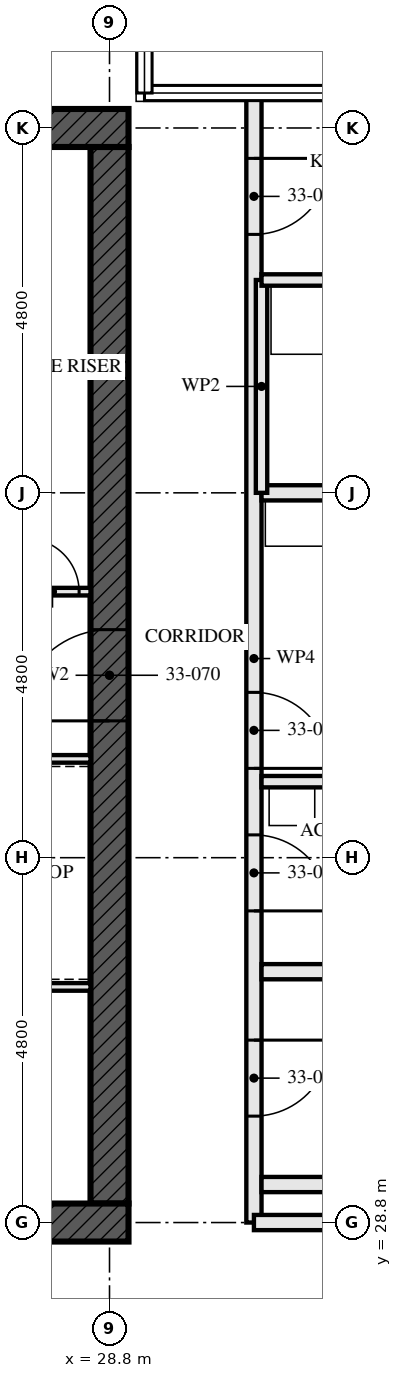
"""IFC4 building model, lengths in metres.
Left out: names, types, materials, properties, quantities, classifications, styles, units other than length and angle.
Written with IfcOpenShell. Run it as: python <this file> out.ifc"""

import sys

from ifc_helpers import new_model, si_unit, direction, frame, frame_2d, origin, place, context, subcontext, project, spatial, rectangle, extrude, element, fill, save


model = new_model("IFC4")
c1 = context("Model", 3, precision=1e-05, world=origin(), true_north=direction((0.0, 1.0)))
c2 = subcontext(c1, "Body", "Model", "MODEL_VIEW")
j1 = project(units=[si_unit("LENGTHUNIT", "METRE"), si_unit("PLANEANGLEUNIT", "RADIAN")], contexts=[c1])
p1 = place(None, origin())
s1 = spatial("IfcSite", under=j1, at=p1, CompositionType="ELEMENT")
p2 = place(p1, origin())
s2 = spatial("IfcBuilding", under=s1, at=p2, CompositionType="ELEMENT")
p3 = place(p2, frame((0.0, 0.0, 122.5)))
s3 = spatial("IfcBuildingStorey", under=s2, at=p3, CompositionType="ELEMENT", Elevation=122.5)
p4 = place(p3, frame((14.15, 28.8, -0.17), z_axis=(0.0, 0.0, 1.0), x_axis=(1.0, 0.0, 0.0)))
e1 = element("IfcWall", 1, at=p4, inside=s3, PredefinedType="SHEAR", context=c2, shape_type="SweptSolid", body=[
    extrude(rectangle(XDim=14.9, YDim=0.5, at=frame_2d((7.45, 0.0))), origin(), (0.0, 0.0, 1.0), 3.5),
])
p5 = place(p4, frame((6.85, 0.0, 0.17)))
e2 = element("IfcOpeningElement", 2, at=p5, cuts=e1, PredefinedType="OPENING", context=c2, shape_type="SweptSolid", body=[
    extrude(rectangle(XDim=1.2, YDim=2.1, at=frame_2d((0.6, 1.05))), frame((0.0, 0.26, 0.0), z_axis=(0.0, -1.0, 0.0), x_axis=(1.0, 0.0, 0.0)), (0.0, 0.0, 1.0), 0.521),
])
p6 = place(p3, frame((29.05, 43.2, -0.17), z_axis=(0.0, 0.0, 1.0), x_axis=(-1.0, 0.0, 0.0)))
e3 = element("IfcWall", 3, at=p6, inside=s3, PredefinedType="SHEAR", context=c2, shape_type="SweptSolid", body=[
    extrude(rectangle(XDim=14.9, YDim=0.5, at=frame_2d((7.45, 0.0))), origin(), (0.0, 0.0, 1.0), 3.5),
])
p7 = place(p6, frame((6.85, 0.0, 0.17)))
e4 = element("IfcOpeningElement", 4, at=p7, cuts=e3, PredefinedType="OPENING", context=c2, shape_type="SweptSolid", body=[
    extrude(rectangle(XDim=1.2, YDim=2.1, at=frame_2d((0.6, 1.05))), frame((0.0, 0.26, 0.0), z_axis=(0.0, -1.0, 0.0), x_axis=(1.0, 0.0, 0.0)), (0.0, 0.0, 1.0), 0.521),
])
p8 = place(p3, frame((28.8, 29.05, -0.17), z_axis=(0.0, 0.0, 1.0), x_axis=(0.0, 1.0, 0.0)))
e5 = element("IfcWall", 5, at=p8, inside=s3, PredefinedType="SHEAR", context=c2, shape_type="SweptSolid", body=[
    extrude(rectangle(XDim=13.9, YDim=0.5, at=frame_2d((6.95, 0.0))), origin(), (0.0, 0.0, 1.0), 3.5),
])
p9 = place(p8, frame((6.35, 0.0, 0.17)))
e6 = element("IfcOpeningElement", 6, at=p9, cuts=e5, PredefinedType="OPENING", context=c2, shape_type="SweptSolid", body=[
    extrude(rectangle(XDim=1.2, YDim=2.1, at=frame_2d((0.6, 1.05))), frame((0.0, 0.26, 0.0), z_axis=(0.0, -1.0, 0.0), x_axis=(1.0, 0.0, 0.0)), (0.0, 0.0, 1.0), 0.521),
])
for number, where, z_axis, x_axis in (
    (7, (35.5, 29.3, 0.0), (0.0, 0.0, 1.0), (-1.0, 0.0, 0.0)),
    (8, (35.5, 32.1, 0.0), (0.0, 0.0, 1.0), (-1.0, 0.0, 0.0)),
):
    element("IfcWall", number, at=place(p3, frame(where, z_axis=z_axis, x_axis=x_axis)), inside=s3, PredefinedType="SOLIDWALL", context=c2, shape_type="SweptSolid", body=[
        extrude(rectangle(XDim=4.7, YDim=0.2, at=frame_2d((2.35, 0.0))), origin(), (0.0, 0.0, 1.0), 2.99),
    ])
p10 = place(p3, frame((33.8, 34.6, 0.0), z_axis=(0.0, 0.0, 1.0), x_axis=(-1.0, 0.0, 0.0)))
e9 = element("IfcWall", 9, at=p10, inside=s3, PredefinedType="PARTITIONING", context=c2, shape_type="SweptSolid", body=[
    extrude(rectangle(XDim=3.0, YDim=0.15, at=frame_2d((1.5, 0.0))), origin(), (0.0, 0.0, 1.0), 3.33),
])
p11 = place(p3, frame((38.08, 38.4, 0.0), z_axis=(0.0, 0.0, 1.0), x_axis=(-1.0, 0.0, 0.0)))
e10 = element("IfcWall", 10, at=p11, inside=s3, PredefinedType="PARTITIONING", context=c2, shape_type="SweptSolid", body=[
    extrude(rectangle(XDim=7.28, YDim=0.2, at=frame_2d((3.64, 0.0))), origin(), (0.0, 0.0, 1.0), 2.55),
])
p12 = place(p3, frame((33.8, 41.2, 0.0), z_axis=(0.0, 0.0, 1.0), x_axis=(-1.0, 0.0, 0.0)))
e11 = element("IfcWall", 11, at=p12, inside=s3, PredefinedType="PARTITIONING", context=c2, shape_type="SweptSolid", body=[
    extrude(rectangle(XDim=3.0, YDim=0.15, at=frame_2d((1.5, 0.0))), origin(), (0.0, 0.0, 1.0), 3.33),
])
p13 = place(p3, frame((30.8, 38.4, 0.0), z_axis=(0.0, 0.0, 1.0), x_axis=(0.0, 1.0, 0.0)))
e12 = element("IfcWall", 12, at=p13, inside=s3, PredefinedType="PARTITIONING", context=c2, shape_type="SweptSolid", body=[
    extrude(rectangle(XDim=2.8, YDim=0.15, at=frame_2d((1.4, 0.0))), origin(), (0.0, 0.0, 1.0), 3.33),
])
p14 = place(p3, frame((30.7, 28.8, 0.0), z_axis=(0.0, 0.0, 1.0), x_axis=(0.0, 1.0, 0.0)))
e13 = element("IfcWall", 13, at=p14, inside=s3, PredefinedType="PARTITIONING", context=c2, shape_type="SweptSolid", body=[
    extrude(rectangle(XDim=14.84, YDim=0.2, at=frame_2d((7.42, 0.0))), origin(), (0.0, 0.0, 1.0), 2.32),
])
p15 = place(p14, frame((1.4, 0.0, 0.0)))
e14 = element("IfcOpeningElement", 14, at=p15, cuts=e13, PredefinedType="OPENING", context=c2, shape_type="SweptSolid", body=[
    extrude(rectangle(XDim=1.0, YDim=2.1, at=frame_2d((0.5, 1.05))), frame((0.0, 0.111, 0.0), z_axis=(0.0, -1.0, 0.0), x_axis=(1.0, 0.0, 0.0)), (0.0, 0.0, 1.0), 0.221),
])
p16 = place(p14, frame((4.1, 0.0, 0.0)))
e15 = element("IfcOpeningElement", 15, at=p16, cuts=e13, PredefinedType="OPENING", context=c2, shape_type="SweptSolid", body=[
    extrude(rectangle(XDim=1.0, YDim=2.1, at=frame_2d((0.5, 1.05))), frame((0.0, 0.111, 0.0), z_axis=(0.0, -1.0, 0.0), x_axis=(1.0, 0.0, 0.0)), (0.0, 0.0, 1.0), 0.221),
])
p17 = place(p14, frame((5.975, 0.0, 0.0)))
e16 = element("IfcOpeningElement", 16, at=p17, cuts=e13, PredefinedType="OPENING", context=c2, shape_type="SweptSolid", body=[
    extrude(rectangle(XDim=1.0, YDim=2.1, at=frame_2d((0.5, 1.05))), frame((0.0, 0.111, 0.0), z_axis=(0.0, -1.0, 0.0), x_axis=(1.0, 0.0, 0.0)), (0.0, 0.0, 1.0), 0.221),
])
p18 = place(p14, frame((13.0, 0.0, 0.0)))
e17 = element("IfcOpeningElement", 17, at=p18, cuts=e13, PredefinedType="OPENING", context=c2, shape_type="SweptSolid", body=[
    extrude(rectangle(XDim=1.0, YDim=2.1, at=frame_2d((0.5, 1.05))), frame((0.0, 0.111, 0.0), z_axis=(0.0, -1.0, 0.0), x_axis=(1.0, 0.0, 0.0)), (0.0, 0.0, 1.0), 0.221),
])
p19 = place(p3, frame((23.05, 34.9, 0.0), z_axis=(0.0, 0.0, 1.0), x_axis=(1.0, 0.0, 0.0)))
e18 = element("IfcWall", 18, at=p19, inside=s3, PredefinedType="SOLIDWALL", context=c2, shape_type="SweptSolid", body=[
    extrude(rectangle(XDim=5.5, YDim=0.1, at=frame_2d((2.75, 0.0))), origin(), (0.0, 0.0, 1.0), 3.33),
])
p20 = place(p3, frame((22.65, 37.1, 0.0), z_axis=(0.0, 0.0, 1.0), x_axis=(1.0, 0.0, 0.0)))
e19 = element("IfcWall", 19, at=p20, inside=s3, PredefinedType="SOLIDWALL", context=c2, shape_type="SweptSolid", body=[
    extrude(rectangle(XDim=5.9, YDim=0.1, at=frame_2d((2.95, 0.0))), origin(), (0.0, 0.0, 1.0), 3.33),
])
p21 = place(p20, frame((3.5, 0.0, 0.0)))
e20 = element("IfcOpeningElement", 20, at=p21, cuts=e19, PredefinedType="OPENING", context=c2, shape_type="SweptSolid", body=[
    extrude(rectangle(XDim=0.9, YDim=2.1, at=frame_2d((0.45, 1.05))), frame((0.0, 0.061, 0.0), z_axis=(0.0, -1.0, 0.0), x_axis=(1.0, 0.0, 0.0)), (0.0, 0.0, 1.0), 0.121),
])
p22 = place(p20, frame((5.05, 0.0, 0.0)))
e21 = element("IfcOpeningElement", 21, at=p22, cuts=e19, PredefinedType="OPENING", context=c2, shape_type="SweptSolid", body=[
    extrude(rectangle(XDim=0.7, YDim=2.1, at=frame_2d((0.35, 1.05))), frame((0.0, 0.061, 0.0), z_axis=(0.0, -1.0, 0.0), x_axis=(1.0, 0.0, 0.0)), (0.0, 0.0, 1.0), 0.121),
])
p23 = place(p3, frame((23.15, 31.9, 0.0), z_axis=(0.0, 0.0, 1.0), x_axis=(1.0, 0.0, 0.0)))
e22 = element("IfcWall", 22, at=p23, inside=s3, PredefinedType="SOLIDWALL", context=c2, shape_type="SweptSolid", body=[
    extrude(rectangle(XDim=5.4, YDim=0.1, at=frame_2d((2.7, 0.0))), origin(), (0.0, 0.0, 1.0), 3.33),
])
p24 = place(p3, frame((33.255, 28.8, 0.0), z_axis=(0.0, 0.0, 1.0), x_axis=(-1.0, 0.0, 0.0)))
e23 = element("IfcWall", 23, at=p24, inside=s3, PredefinedType="PARTITIONING", context=c2, shape_type="SweptSolid", body=[
    extrude(rectangle(XDim=2.555, YDim=0.2, at=frame_2d((1.277, 0.0))), origin(), (0.0, 0.0, 1.0), 2.32),
])
p25 = place(p15, frame((1.0, 0.0, 0.0), z_axis=(0.0, 0.0, 1.0), x_axis=(-1.0, 0.0, 0.0)))
e24 = element("IfcDoor", 24, at=p25, inside=s3, OperationType="SINGLE_SWING_RIGHT", PredefinedType="DOOR", context=c2, shape_type="SweptSolid", body=[
    extrude(rectangle(XDim=1.0, YDim=2.1, at=frame_2d((0.5, 1.05))), frame((0.0, 0.032, 0.0), z_axis=(0.0, -1.0, 0.0), x_axis=(1.0, 0.0, 0.0)), (0.0, 0.0, 1.0), 0.064),
])
fill(e14, e24)
p26 = place(p16, frame((1.0, 0.0, 0.0), z_axis=(0.0, 0.0, 1.0), x_axis=(-1.0, 0.0, 0.0)))
e25 = element("IfcDoor", 25, at=p26, inside=s3, OperationType="SINGLE_SWING_LEFT", PredefinedType="DOOR", context=c2, shape_type="SweptSolid", body=[
    extrude(rectangle(XDim=1.0, YDim=2.1, at=frame_2d((0.5, 1.05))), frame((0.0, 0.027, 0.0), z_axis=(0.0, -1.0, 0.0), x_axis=(1.0, 0.0, 0.0)), (0.0, 0.0, 1.0), 0.054),
])
fill(e15, e25)
p27 = place(p17, frame((1.0, 0.0, 0.0), z_axis=(0.0, 0.0, 1.0), x_axis=(-1.0, 0.0, 0.0)))
e26 = element("IfcDoor", 26, at=p27, inside=s3, OperationType="SINGLE_SWING_LEFT", PredefinedType="DOOR", context=c2, shape_type="SweptSolid", body=[
    extrude(rectangle(XDim=1.0, YDim=2.1, at=frame_2d((0.5, 1.05))), frame((0.0, 0.027, 0.0), z_axis=(0.0, -1.0, 0.0), x_axis=(1.0, 0.0, 0.0)), (0.0, 0.0, 1.0), 0.054),
])
fill(e16, e26)
p28 = place(p18, frame((1.0, 0.0, 0.0), z_axis=(0.0, 0.0, 1.0), x_axis=(-1.0, 0.0, 0.0)))
e27 = element("IfcDoor", 27, at=p28, inside=s3, OperationType="SINGLE_SWING_RIGHT", PredefinedType="DOOR", context=c2, shape_type="SweptSolid", body=[
    extrude(rectangle(XDim=1.0, YDim=2.1, at=frame_2d((0.5, 1.05))), frame((0.0, 0.027, 0.0), z_axis=(0.0, -1.0, 0.0), x_axis=(1.0, 0.0, 0.0)), (0.0, 0.0, 1.0), 0.054),
])
fill(e17, e27)
p29 = place(p22, origin())
e28 = element("IfcDoor", 28, at=p29, inside=s3, OperationType="SINGLE_SWING_RIGHT", PredefinedType="DOOR", context=c2, shape_type="SweptSolid", body=[
    extrude(rectangle(XDim=0.7, YDim=2.1, at=frame_2d((0.35, 1.05))), frame((0.0, 0.027, 0.0), z_axis=(0.0, -1.0, 0.0), x_axis=(1.0, 0.0, 0.0)), (0.0, 0.0, 1.0), 0.054),
])
fill(e21, e28)
p30 = place(p9, origin())
e29 = element("IfcDoor", 29, at=p30, inside=s3, OperationType="SINGLE_SWING_LEFT", PredefinedType="DOOR", context=c2, shape_type="SweptSolid", body=[
    extrude(rectangle(XDim=1.2, YDim=2.1, at=frame_2d((0.6, 1.05))), frame((0.0, 0.027, 0.0), z_axis=(0.0, -1.0, 0.0), x_axis=(1.0, 0.0, 0.0)), (0.0, 0.0, 1.0), 0.054),
])
fill(e6, e29)
save(model, sys.argv[1])
